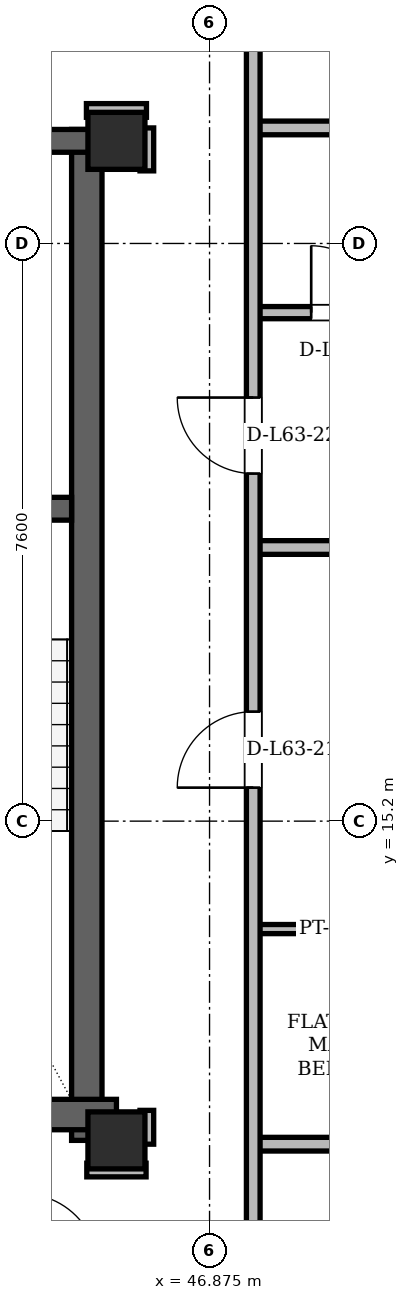
"""IFC4 building model, lengths in metres.
Left out: names, types, materials, properties, quantities, classifications, styles, units other than length and angle.
Written with IfcOpenShell. Run it as: python <this file> out.ifc"""

import sys

from ifc_helpers import new_model, si_unit, direction, frame, frame_2d, origin, origin_2d, place, context, subcontext, project, spatial, rectangle, hollow_rectangle, extrude, element, fill, save


model = new_model("IFC4")
c1 = context("Model", 3, precision=1e-05, world=origin(), true_north=direction((0.0, 1.0)))
c2 = subcontext(c1, "Body", "Model", "MODEL_VIEW")
j1 = project(units=[si_unit("LENGTHUNIT", "METRE"), si_unit("PLANEANGLEUNIT", "RADIAN")], contexts=[c1])
p1 = place(None, origin())
s1 = spatial("IfcSite", under=j1, at=p1, CompositionType="ELEMENT")
p2 = place(p1, origin())
s2 = spatial("IfcBuilding", under=s1, at=p2, CompositionType="ELEMENT")
p3 = place(p2, frame((0.0, 0.0, 237.9)))
s3 = spatial("IfcBuildingStorey", under=s2, at=p3, CompositionType="ELEMENT", Elevation=237.9)
for number, where, z_axis, x_axis in (
    (1, (45.65, 11.0, 0.0), (0.0, 0.0, 1.0), (1.0, 0.0, 0.0)),
    (2, (45.65, 24.15, 0.0), (0.0, 0.0, 1.0), (1.0, 0.0, 0.0)),
):
    element("IfcColumn", number, at=place(p3, frame(where, z_axis=z_axis, x_axis=x_axis)), inside=s3, PredefinedType="COLUMN", context=c2, shape_type="SweptSolid", body=[
        extrude(hollow_rectangle(XDim=0.75, YDim=0.75, WallThickness=0.06, at=origin_2d()), origin(), (0.0, 0.0, 1.0), 3.6),
    ])
p4 = place(p3, frame((45.26, 11.0, 0.0), z_axis=(0.0, 0.0, 1.0), x_axis=(0.0, 1.0, 0.0)))
e3 = element("IfcWall", 3, at=p4, inside=s3, PredefinedType="SHEAR", context=c2, shape_type="SweptSolid", body=[
    extrude(rectangle(XDim=13.3, YDim=0.4, at=frame_2d((6.65, 0.0))), origin(), (0.0, 0.0, 1.0), 3.38),
])
p5 = place(p3, frame((38.55, 11.34, 0.0), z_axis=(0.0, 0.0, 1.0), x_axis=(1.0, 0.0, 0.0)))
e4 = element("IfcWall", 4, at=p5, inside=s3, PredefinedType="SHEAR", context=c2, shape_type="SweptSolid", body=[
    extrude(rectangle(XDim=7.1, YDim=0.4, at=frame_2d((3.55, 0.0))), origin(), (0.0, 0.0, 1.0), 3.38),
])
p6 = place(p3, frame((29.65, 24.15, 0.0), z_axis=(0.0, 0.0, 1.0), x_axis=(1.0, 0.0, 0.0)))
e5 = element("IfcWall", 5, at=p6, inside=s3, PredefinedType="SHEAR", context=c2, shape_type="SweptSolid", body=[
    extrude(rectangle(XDim=15.7, YDim=0.3, at=frame_2d((7.85, 0.0))), origin(), (0.0, 0.0, 1.0), 3.38),
])
p7 = place(p6, frame((1.7, 0.0, 0.0)))
e6 = element("IfcOpeningElement", 6, at=p7, cuts=e5, PredefinedType="OPENING", context=c2, shape_type="SweptSolid", body=[
    extrude(rectangle(XDim=1.2, YDim=2.2, at=frame_2d((0.6, 1.1))), frame((0.0, 0.15, 0.0), z_axis=(0.0, -1.0, 0.0), x_axis=(1.0, 0.0, 0.0)), (0.0, 0.0, 1.0), 0.3),
])
p8 = place(p6, frame((12.8, 0.0, 0.0)))
e7 = element("IfcOpeningElement", 7, at=p8, cuts=e5, PredefinedType="OPENING", context=c2, shape_type="SweptSolid", body=[
    extrude(rectangle(XDim=1.2, YDim=2.2, at=frame_2d((0.6, 1.1))), frame((0.0, 0.15, 0.0), z_axis=(0.0, -1.0, 0.0), x_axis=(1.0, 0.0, 0.0)), (0.0, 0.0, 1.0), 0.3),
])
p9 = place(p6, frame((7.4, 0.0, 0.0)))
e8 = element("IfcOpeningElement", 8, at=p9, cuts=e5, PredefinedType="OPENING", context=c2, shape_type="SweptSolid", body=[
    extrude(rectangle(XDim=0.9, YDim=2.05, at=frame_2d((0.45, 1.025))), frame((0.0, 0.15, 0.0), z_axis=(0.0, -1.0, 0.0), x_axis=(1.0, 0.0, 0.0)), (0.0, 0.0, 1.0), 0.3),
])
p10 = place(p3, frame((41.05, 19.31, 0.0), z_axis=(0.0, 0.0, 1.0), x_axis=(1.0, 0.0, 0.0)))
e9 = element("IfcWall", 9, at=p10, inside=s3, PredefinedType="SHEAR", context=c2, shape_type="SweptSolid", body=[
    extrude(rectangle(XDim=4.01, YDim=0.3, at=frame_2d((2.005, 0.0))), origin(), (0.0, 0.0, 1.0), 3.38),
])
p11 = place(p10, frame((1.6, 0.0, 0.0)))
e10 = element("IfcOpeningElement", 10, at=p11, cuts=e9, PredefinedType="OPENING", context=c2, shape_type="SweptSolid", body=[
    extrude(rectangle(XDim=1.4, YDim=2.2, at=frame_2d((0.7, 1.1))), frame((0.0, 0.15, 0.0), z_axis=(0.0, -1.0, 0.0), x_axis=(1.0, 0.0, 0.0)), (0.0, 0.0, 1.0), 0.3),
])
p12 = place(p3, frame((58.899, 11.151, 0.0), z_axis=(0.0, 0.0, 1.0), x_axis=(-0.500002325133, 0.866024061364, 0.0)))
e11 = element("IfcWall", 11, at=p12, inside=s3, PredefinedType="SOLIDWALL", context=c2, shape_type="SweptSolid", body=[
    extrude(rectangle(XDim=36.9, YDim=0.29, at=frame_2d((18.45, 0.0))), origin(), (0.0, 0.0, 1.0), 2.677),
])
p13 = place(p12, frame((3.429, 0.0, 0.0)))
e12 = element("IfcOpeningElement", 12, at=p13, cuts=e11, PredefinedType="OPENING", context=c2, shape_type="SweptSolid", body=[
    extrude(rectangle(XDim=1.5, YDim=2.2, at=frame_2d((0.75, 1.1))), frame((0.0, 0.145, 0.0), z_axis=(0.0, -1.0, 0.0), x_axis=(1.0, 0.0, 0.0)), (0.0, 0.0, 1.0), 0.29),
])
p14 = place(p12, frame((27.156, 0.0, 0.0)))
e13 = element("IfcOpeningElement", 13, at=p14, cuts=e11, PredefinedType="OPENING", context=c2, shape_type="SweptSolid", body=[
    extrude(rectangle(XDim=1.5, YDim=2.2, at=frame_2d((0.75, 1.1))), frame((0.0, 0.145, 0.0), z_axis=(0.0, -1.0, 0.0), x_axis=(1.0, 0.0, 0.0)), (0.0, 0.0, 1.0), 0.29),
])
p15 = place(p12, frame((6.97, 0.0, 0.85)))
e14 = element("IfcOpeningElement", 14, at=p15, cuts=e11, PredefinedType="OPENING", context=c2, shape_type="SweptSolid", body=[
    extrude(rectangle(XDim=1.6, YDim=1.7, at=frame_2d((0.8, 0.85))), frame((0.0, 0.145, 0.0), z_axis=(0.0, -1.0, 0.0), x_axis=(1.0, 0.0, 0.0)), (0.0, 0.0, 1.0), 0.29),
])
p16 = place(p12, frame((1.106, 0.0, 0.85)))
e15 = element("IfcOpeningElement", 15, at=p16, cuts=e11, PredefinedType="OPENING", context=c2, shape_type="SweptSolid", body=[
    extrude(rectangle(XDim=1.6, YDim=1.7, at=frame_2d((0.8, 0.85))), frame((0.0, 0.145, 0.0), z_axis=(0.0, -1.0, 0.0), x_axis=(1.0, 0.0, 0.0)), (0.0, 0.0, 1.0), 0.29),
])
p17 = place(p12, frame((34.697, 0.0, 0.85)))
e16 = element("IfcOpeningElement", 16, at=p17, cuts=e11, PredefinedType="OPENING", context=c2, shape_type="SweptSolid", body=[
    extrude(rectangle(XDim=1.2, YDim=1.48, at=frame_2d((0.6, 0.74))), frame((0.0, 0.145, 0.0), z_axis=(0.0, -1.0, 0.0), x_axis=(1.0, 0.0, 0.0)), (0.0, 0.0, 1.0), 0.29),
])
p18 = place(p12, frame((16.774, 0.0, 0.85)))
e17 = element("IfcOpeningElement", 17, at=p18, cuts=e11, PredefinedType="OPENING", context=c2, shape_type="SweptSolid", body=[
    extrude(rectangle(XDim=2.2, YDim=1.717, at=frame_2d((1.1, 0.858))), frame((0.0, 0.145, 0.0), z_axis=(0.0, -1.0, 0.0), x_axis=(1.0, 0.0, 0.0)), (0.0, 0.0, 1.0), 0.29),
])
p19 = place(p12, frame((22.799, 0.0, 0.85)))
e18 = element("IfcOpeningElement", 18, at=p19, cuts=e11, PredefinedType="OPENING", context=c2, shape_type="SweptSolid", body=[
    extrude(rectangle(XDim=1.6, YDim=1.7, at=frame_2d((0.8, 0.85))), frame((0.0, 0.145, 0.0), z_axis=(0.0, -1.0, 0.0), x_axis=(1.0, 0.0, 0.0)), (0.0, 0.0, 1.0), 0.29),
])
p20 = place(p12, frame((29.059, 0.0, 0.85)))
e19 = element("IfcOpeningElement", 19, at=p20, cuts=e11, PredefinedType="OPENING", context=c2, shape_type="SweptSolid", body=[
    extrude(rectangle(XDim=1.2, YDim=1.48, at=frame_2d((0.6, 0.74))), frame((0.0, 0.145, 0.0), z_axis=(0.0, -1.0, 0.0), x_axis=(1.0, 0.0, 0.0)), (0.0, 0.0, 1.0), 0.29),
])
p21 = place(p12, frame((31.635, 0.0, 0.85)))
e20 = element("IfcOpeningElement", 20, at=p21, cuts=e11, PredefinedType="OPENING", context=c2, shape_type="SweptSolid", body=[
    extrude(rectangle(XDim=1.2, YDim=1.48, at=frame_2d((0.6, 0.74))), frame((0.0, 0.145, 0.0), z_axis=(0.0, -1.0, 0.0), x_axis=(1.0, 0.0, 0.0)), (0.0, 0.0, 1.0), 0.29),
])
p22 = place(p12, frame((12.419, 0.0, 0.85)))
e21 = element("IfcOpeningElement", 21, at=p22, cuts=e11, PredefinedType="OPENING", context=c2, shape_type="SweptSolid", body=[
    extrude(rectangle(XDim=1.2, YDim=1.48, at=frame_2d((0.6, 0.74))), frame((0.0, 0.145, 0.0), z_axis=(0.0, -1.0, 0.0), x_axis=(1.0, 0.0, 0.0)), (0.0, 0.0, 1.0), 0.29),
])
p23 = place(p3, frame((45.26, 10.61, 0.0), z_axis=(0.0, 0.0, 1.0), x_axis=(1.0, 0.0, 0.0)))
e22 = element("IfcWall", 22, at=p23, inside=s3, PredefinedType="PARTITIONING", context=c2, shape_type="SweptSolid", body=[
    extrude(rectangle(XDim=0.78, YDim=0.18, at=frame_2d((0.39, 0.0))), origin(), (0.0, 0.0, 1.0), 3.38),
])
p24 = place(p3, frame((47.45, 10.95, 0.0), z_axis=(0.0, 0.0, 1.0), x_axis=(1.0, 0.0, 0.0)))
e23 = element("IfcWall", 23, at=p24, inside=s3, PredefinedType="PARTITIONING", context=c2, shape_type="SweptSolid", body=[
    extrude(rectangle(XDim=11.063, YDim=0.18, at=frame_2d((5.532, 0.0))), origin(), (0.0, 0.0, 1.0), 2.913),
])
p25 = place(p3, frame((47.4, 13.78, 0.0), z_axis=(0.0, 0.0, 1.0), x_axis=(1.0, 0.0, 0.0)))
e24 = element("IfcWall", 24, at=p25, inside=s3, PredefinedType="PARTITIONING", context=c2, shape_type="SweptSolid", body=[
    extrude(rectangle(XDim=9.81, YDim=0.12, at=frame_2d((4.905, 0.0))), origin(), (0.0, 0.0, 1.0), 3.38),
])
p26 = place(p25, frame((2.228, 0.0, 0.0)))
e25 = element("IfcOpeningElement", 25, at=p26, cuts=e24, PredefinedType="OPENING", context=c2, shape_type="SweptSolid", body=[
    extrude(rectangle(XDim=0.92, YDim=2.12, at=frame_2d((0.46, 1.06))), frame((0.0, 0.06, 0.0), z_axis=(0.0, -1.0, 0.0), x_axis=(1.0, 0.0, 0.0)), (0.0, 0.0, 1.0), 0.12),
])
p27 = place(p25, frame((5.998, 0.0, 0.0)))
e26 = element("IfcOpeningElement", 26, at=p27, cuts=e24, PredefinedType="OPENING", context=c2, shape_type="SweptSolid", body=[
    extrude(rectangle(XDim=0.95, YDim=2.1, at=frame_2d((0.475, 1.05))), frame((0.0, 0.06, 0.0), z_axis=(0.0, -1.0, 0.0), x_axis=(1.0, 0.0, 0.0)), (0.0, 0.0, 1.0), 0.12),
])
p28 = place(p25, frame((8.276, 0.0, 0.0)))
e27 = element("IfcOpeningElement", 27, at=p28, cuts=e24, PredefinedType="OPENING", context=c2, shape_type="SweptSolid", body=[
    extrude(rectangle(XDim=0.88, YDim=2.08, at=frame_2d((0.44, 1.04))), frame((0.0, 0.06, 0.0), z_axis=(0.0, -1.0, 0.0), x_axis=(1.0, 0.0, 0.0)), (0.0, 0.0, 1.0), 0.12),
])
p29 = place(p3, frame((47.45, 18.8, 0.0), z_axis=(0.0, 0.0, 1.0), x_axis=(1.0, 0.0, 0.0)))
e28 = element("IfcWall", 28, at=p29, inside=s3, PredefinedType="PARTITIONING", context=c2, shape_type="SweptSolid", body=[
    extrude(rectangle(XDim=6.861, YDim=0.18, at=frame_2d((3.431, 0.0))), origin(), (0.0, 0.0, 1.0), 3.38),
])
p30 = place(p3, frame((47.4, 21.89, 0.0), z_axis=(0.0, 0.0, 1.0), x_axis=(1.0, 0.0, 0.0)))
e29 = element("IfcWall", 29, at=p30, inside=s3, PredefinedType="PARTITIONING", context=c2, shape_type="SweptSolid", body=[
    extrude(rectangle(XDim=5.127, YDim=0.16, at=frame_2d((2.563, 0.0))), origin(), (0.0, 0.0, 1.0), 3.38),
])
p31 = place(p30, frame((0.812, 0.0, 0.0)))
e30 = element("IfcOpeningElement", 30, at=p31, cuts=e29, PredefinedType="OPENING", context=c2, shape_type="SweptSolid", body=[
    extrude(rectangle(XDim=0.88, YDim=2.08, at=frame_2d((0.44, 1.04))), frame((0.0, 0.08, 0.0), z_axis=(0.0, -1.0, 0.0), x_axis=(1.0, 0.0, 0.0)), (0.0, 0.0, 1.0), 0.16),
])
p32 = place(p30, frame((3.345, 0.0, 0.0)))
e31 = element("IfcOpeningElement", 31, at=p32, cuts=e29, PredefinedType="OPENING", context=c2, shape_type="SweptSolid", body=[
    extrude(rectangle(XDim=0.95, YDim=2.1, at=frame_2d((0.475, 1.05))), frame((0.0, 0.08, 0.0), z_axis=(0.0, -1.0, 0.0), x_axis=(1.0, 0.0, 0.0)), (0.0, 0.0, 1.0), 0.16),
])
p33 = place(p3, frame((47.45, 24.32, 0.0), z_axis=(0.0, 0.0, 1.0), x_axis=(1.0, 0.0, 0.0)))
e32 = element("IfcWall", 32, at=p33, inside=s3, PredefinedType="PARTITIONING", context=c2, shape_type="SweptSolid", body=[
    extrude(rectangle(XDim=3.674, YDim=0.18, at=frame_2d((1.837, 0.0))), origin(), (0.0, 0.0, 1.0), 3.38),
])
p34 = place(p3, frame((45.255, 24.55, 0.0), z_axis=(0.0, 0.0, 1.0), x_axis=(1.0, 0.0, 0.0)))
e33 = element("IfcWall", 33, at=p34, inside=s3, PredefinedType="PARTITIONING", context=c2, shape_type="SweptSolid", body=[
    extrude(rectangle(XDim=0.79, YDim=0.18, at=frame_2d((0.395, 0.0))), origin(), (0.0, 0.0, 1.0), 2.913),
])
p35 = place(p3, frame((46.05, 10.95, 0.0), z_axis=(0.0, 0.0, 1.0), x_axis=(0.0, 1.0, 0.0)))
e34 = element("IfcWall", 34, at=p35, inside=s3, PredefinedType="PARTITIONING", context=c2, shape_type="SweptSolid", body=[
    extrude(rectangle(XDim=0.445, YDim=0.18, at=frame_2d((0.223, 0.0))), origin(), (0.0, 0.0, 1.0), 2.913),
])
p36 = place(p3, frame((46.05, 23.755, 0.0), z_axis=(0.0, 0.0, 1.0), x_axis=(0.0, 1.0, 0.0)))
e35 = element("IfcWall", 35, at=p36, inside=s3, PredefinedType="PARTITIONING", context=c2, shape_type="SweptSolid", body=[
    extrude(rectangle(XDim=0.565, YDim=0.18, at=frame_2d((0.283, 0.0))), origin(), (0.0, 0.0, 1.0), 3.38),
])
p37 = place(p3, frame((47.45, 9.394, 0.0), z_axis=(0.0, 0.0, 1.0), x_axis=(0.0, 1.0, 0.0)))
e36 = element("IfcWall", 36, at=p37, inside=s3, PredefinedType="PARTITIONING", context=c2, shape_type="SweptSolid", body=[
    extrude(rectangle(XDim=16.482, YDim=0.18, at=frame_2d((8.241, 0.0))), origin(), (0.0, 0.0, 1.0), 2.913),
])
p38 = place(p37, frame((6.247, 0.0, 0.0)))
e37 = element("IfcOpeningElement", 37, at=p38, cuts=e36, PredefinedType="OPENING", context=c2, shape_type="SweptSolid", body=[
    extrude(rectangle(XDim=1.0, YDim=2.18, at=frame_2d((0.5, 1.09))), frame((0.0, 0.09, 0.0), z_axis=(0.0, -1.0, 0.0), x_axis=(1.0, 0.0, 0.0)), (0.0, 0.0, 1.0), 0.18),
])
p39 = place(p37, frame((10.379, 0.0, 0.0)))
e38 = element("IfcOpeningElement", 38, at=p39, cuts=e36, PredefinedType="OPENING", context=c2, shape_type="SweptSolid", body=[
    extrude(rectangle(XDim=1.0, YDim=2.18, at=frame_2d((0.5, 1.09))), frame((0.0, 0.09, 0.0), z_axis=(0.0, -1.0, 0.0), x_axis=(1.0, 0.0, 0.0)), (0.0, 0.0, 1.0), 0.18),
])
p40 = place(p31, origin())
e39 = element("IfcDoor", 39, at=p40, inside=s3, OperationType="SINGLE_SWING_LEFT", PredefinedType="DOOR", context=c2, shape_type="SweptSolid", body=[
    extrude(rectangle(XDim=0.88, YDim=2.08, at=frame_2d((0.44, 1.04))), frame((0.0, 0.025, 0.0), z_axis=(0.0, -1.0, 0.0), x_axis=(1.0, 0.0, 0.0)), (0.0, 0.0, 1.0), 0.05),
])
fill(e30, e39)
p41 = place(p38, origin())
e40 = element("IfcDoor", 40, at=p41, inside=s3, OperationType="SINGLE_SWING_LEFT", PredefinedType="DOOR", context=c2, shape_type="SweptSolid", body=[
    extrude(rectangle(XDim=1.0, YDim=2.18, at=frame_2d((0.5, 1.09))), frame((0.0, 0.025, 0.0), z_axis=(0.0, -1.0, 0.0), x_axis=(1.0, 0.0, 0.0)), (0.0, 0.0, 1.0), 0.05),
])
fill(e37, e40)
p42 = place(p39, origin())
e41 = element("IfcDoor", 41, at=p42, inside=s3, OperationType="SINGLE_SWING_RIGHT", PredefinedType="DOOR", context=c2, shape_type="SweptSolid", body=[
    extrude(rectangle(XDim=1.0, YDim=2.18, at=frame_2d((0.5, 1.09))), frame((0.0, 0.025, 0.0), z_axis=(0.0, -1.0, 0.0), x_axis=(1.0, 0.0, 0.0)), (0.0, 0.0, 1.0), 0.05),
])
fill(e38, e41)
save(model, sys.argv[1])
